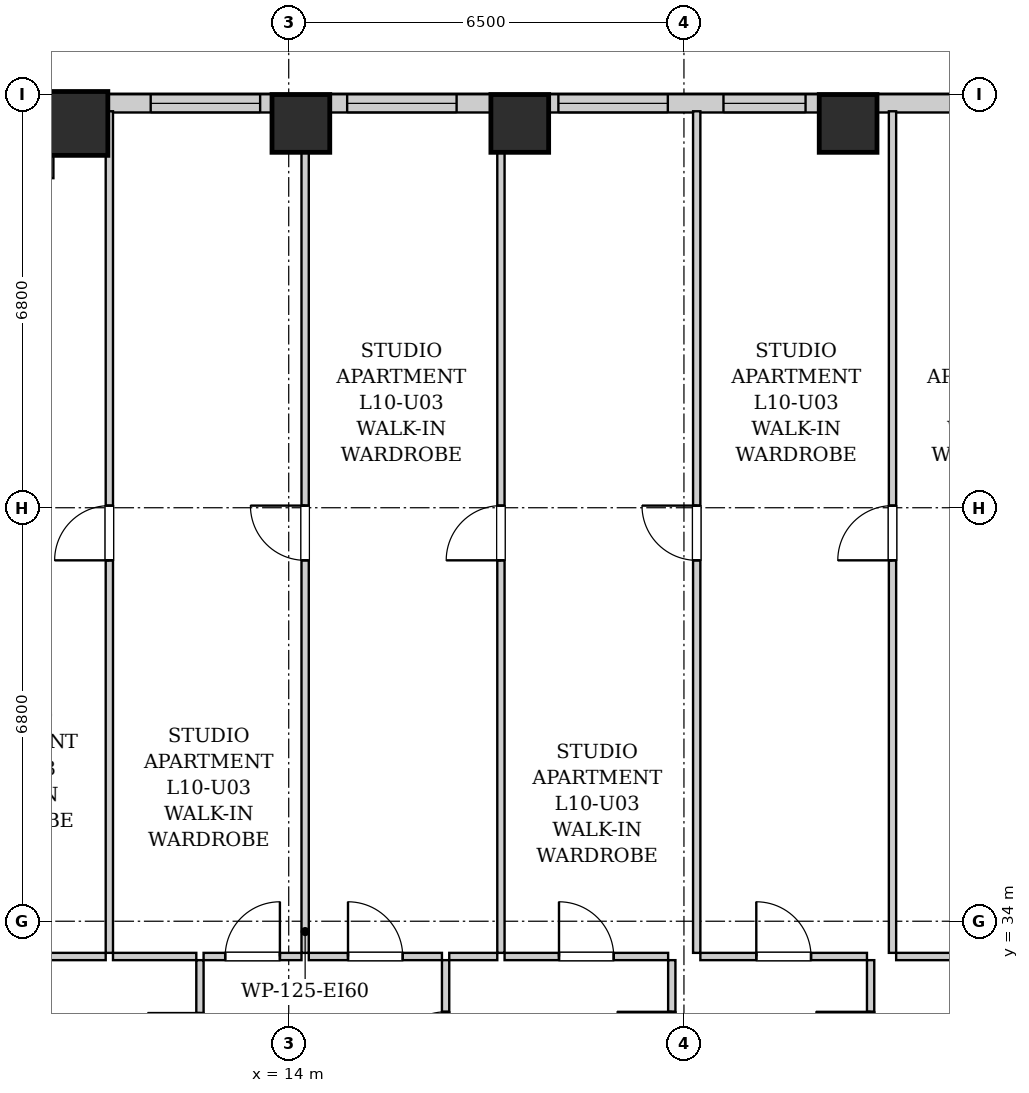
"""IFC4 building model, lengths in metres.
Left out: names, types, materials, properties, quantities, classifications, styles, units other than length and angle.
Written with IfcOpenShell. Run it as: python <this file> out.ifc"""

import sys

from ifc_helpers import new_model, si_unit, direction, frame, frame_2d, origin, origin_2d, place, context, subcontext, project, spatial, rectangle, extrude, element, fill, save


model = new_model("IFC4")
c1 = context("Model", 3, precision=1e-05, world=origin(), true_north=direction((0.0, 1.0)))
c2 = subcontext(c1, "Body", "Model", "MODEL_VIEW")
j1 = project(units=[si_unit("LENGTHUNIT", "METRE"), si_unit("PLANEANGLEUNIT", "RADIAN")], contexts=[c1])
p1 = place(None, origin())
s1 = spatial("IfcSite", under=j1, at=p1, CompositionType="ELEMENT")
p2 = place(p1, origin())
s2 = spatial("IfcBuilding", under=s1, at=p2, CompositionType="ELEMENT")
p3 = place(p2, frame((0.0, 0.0, 41.8)))
s3 = spatial("IfcBuildingStorey", under=s2, at=p3, CompositionType="ELEMENT", Elevation=41.8)
p4 = place(p3, frame((10.5, 47.12, 0.0), z_axis=(0.0, 0.0, 1.0), x_axis=(1.0, 0.0, 0.0)))
e1 = element("IfcColumn", 1, at=p4, inside=s3, PredefinedType="COLUMN", context=c2, shape_type="SweptSolid", body=[
    extrude(rectangle(XDim=1.05, YDim=1.05, at=origin_2d()), origin(), (0.0, 0.0, 1.0), 3.2),
])
for number, where, z_axis, x_axis in (
    (2, (14.2, 47.12, 0.0), (0.0, 0.0, 1.0), (1.0, 0.0, 0.0)),
    (3, (17.8, 47.12, 0.0), (0.0, 0.0, 1.0), (1.0, 0.0, 0.0)),
    (4, (23.2, 47.12, 0.0), (0.0, 0.0, 1.0), (1.0, 0.0, 0.0)),
):
    element("IfcColumn", number, at=place(p3, frame(where, z_axis=z_axis, x_axis=x_axis)), inside=s3, PredefinedType="COLUMN", context=c2, shape_type="SweptSolid", body=[
        extrude(rectangle(XDim=0.95, YDim=0.95, at=origin_2d()), origin(), (0.0, 0.0, 1.0), 3.2),
    ])
p5 = place(p3, frame((10.0, 47.45, 0.0), z_axis=(0.0, 0.0, 1.0), x_axis=(1.0, 0.0, 0.0)))
e5 = element("IfcWall", 5, at=p5, inside=s3, PredefinedType="SOLIDWALL", context=c2, shape_type="SweptSolid", body=[
    extrude(rectangle(XDim=25.7, YDim=0.3, at=frame_2d((12.85, 0.0))), origin(), (0.0, 0.0, 1.0), 1.975),
])
p6 = place(p5, frame((1.73, 0.0, 0.55)))
e6 = element("IfcOpeningElement", 6, at=p6, cuts=e5, PredefinedType="OPENING", context=c2, shape_type="SweptSolid", body=[
    extrude(rectangle(XDim=1.8, YDim=1.2, at=frame_2d((0.9, 0.6))), frame((0.0, 0.16, 0.0), z_axis=(0.0, -1.0, 0.0), x_axis=(1.0, 0.0, 0.0)), (0.0, 0.0, 1.0), 0.32),
])
p7 = place(p5, frame((4.961, 0.0, 0.55)))
e7 = element("IfcOpeningElement", 7, at=p7, cuts=e5, PredefinedType="OPENING", context=c2, shape_type="SweptSolid", body=[
    extrude(rectangle(XDim=1.8, YDim=1.2, at=frame_2d((0.9, 0.6))), frame((0.0, 0.16, 0.0), z_axis=(0.0, -1.0, 0.0), x_axis=(1.0, 0.0, 0.0)), (0.0, 0.0, 1.0), 0.32),
])
p8 = place(p5, frame((8.435, 0.0, 0.55)))
e8 = element("IfcOpeningElement", 8, at=p8, cuts=e5, PredefinedType="OPENING", context=c2, shape_type="SweptSolid", body=[
    extrude(rectangle(XDim=1.8, YDim=1.2, at=frame_2d((0.9, 0.6))), frame((0.0, 0.16, 0.0), z_axis=(0.0, -1.0, 0.0), x_axis=(1.0, 0.0, 0.0)), (0.0, 0.0, 1.0), 0.32),
])
p9 = place(p5, frame((11.15, 0.0, 0.55)))
e9 = element("IfcOpeningElement", 9, at=p9, cuts=e5, PredefinedType="OPENING", context=c2, shape_type="SweptSolid", body=[
    extrude(rectangle(XDim=1.35, YDim=1.2, at=frame_2d((0.675, 0.6))), frame((0.0, 0.16, 0.0), z_axis=(0.0, -1.0, 0.0), x_axis=(1.0, 0.0, 0.0)), (0.0, 0.0, 1.0), 0.32),
])
p10 = place(p5, frame((17.812, 0.0, 0.55)))
e10 = element("IfcOpeningElement", 10, at=p10, cuts=e5, PredefinedType="OPENING", context=c2, shape_type="SweptSolid", body=[
    extrude(rectangle(XDim=1.8, YDim=1.2, at=frame_2d((0.9, 0.6))), frame((0.0, 0.16, 0.0), z_axis=(0.0, -1.0, 0.0), x_axis=(1.0, 0.0, 0.0)), (0.0, 0.0, 1.0), 0.32),
])
p11 = place(p5, frame((20.765, 0.0, 0.55)))
e11 = element("IfcOpeningElement", 11, at=p11, cuts=e5, PredefinedType="OPENING", context=c2, shape_type="SweptSolid", body=[
    extrude(rectangle(XDim=1.8, YDim=1.2, at=frame_2d((0.9, 0.6))), frame((0.0, 0.16, 0.0), z_axis=(0.0, -1.0, 0.0), x_axis=(1.0, 0.0, 0.0)), (0.0, 0.0, 1.0), 0.32),
])
p12 = place(p5, frame((23.835, 0.0, 0.55)))
e12 = element("IfcOpeningElement", 12, at=p12, cuts=e5, PredefinedType="OPENING", context=c2, shape_type="SweptSolid", body=[
    extrude(rectangle(XDim=1.35, YDim=1.2, at=frame_2d((0.675, 0.6))), frame((0.0, 0.16, 0.0), z_axis=(0.0, -1.0, 0.0), x_axis=(1.0, 0.0, 0.0)), (0.0, 0.0, 1.0), 0.32),
])
p13 = place(p3, frame((10.0, 46.22, 0.0), z_axis=(0.0, 0.0, 1.0), x_axis=(0.0, 1.0, 0.0)))
e13 = element("IfcWall", 13, at=p13, inside=s3, PredefinedType="SOLIDWALL", context=c2, shape_type="SweptSolid", body=[
    extrude(rectangle(XDim=1.078, YDim=0.26, at=frame_2d((0.539, 0.0))), origin(), (0.0, 0.0, 1.0), 2.94),
])
p14 = place(p3, frame((12.54, 30.76, 0.0), z_axis=(0.0, 0.0, 1.0), x_axis=(0.0, 1.0, 0.0)))
e14 = element("IfcWall", 14, at=p14, inside=s3, PredefinedType="PARTITIONING", context=c2, shape_type="SweptSolid", body=[
    extrude(rectangle(XDim=2.6, YDim=0.12, at=frame_2d((1.3, 0.0))), origin(), (0.0, 0.0, 1.0), 2.94),
])
p15 = place(p14, frame((0.87, 0.0, 0.0)))
e15 = element("IfcOpeningElement", 15, at=p15, cuts=e14, PredefinedType="OPENING", context=c2, shape_type="SweptSolid", body=[
    extrude(rectangle(XDim=0.86, YDim=2.05, at=frame_2d((0.43, 1.025))), frame((0.0, 0.07, 0.0), z_axis=(0.0, -1.0, 0.0), x_axis=(1.0, 0.0, 0.0)), (0.0, 0.0, 1.0), 0.14),
])
p16 = place(p3, frame((10.08, 33.42, 0.0), z_axis=(0.0, 0.0, 1.0), x_axis=(1.0, 0.0, 0.0)))
e16 = element("IfcWall", 16, at=p16, inside=s3, PredefinedType="PARTITIONING", context=c2, shape_type="SweptSolid", body=[
    extrude(rectangle(XDim=0.91, YDim=0.12, at=frame_2d((0.455, 0.0))), origin(), (0.0, 0.0, 1.0), 2.94),
])
p17 = place(p3, frame((11.11, 33.42, 0.0), z_axis=(0.0, 0.0, 1.0), x_axis=(1.0, 0.0, 0.0)))
e17 = element("IfcWall", 17, at=p17, inside=s3, PredefinedType="PARTITIONING", context=c2, shape_type="SweptSolid", body=[
    extrude(rectangle(XDim=1.37, YDim=0.12, at=frame_2d((0.685, 0.0))), origin(), (0.0, 0.0, 1.0), 2.94),
])
p18 = place(p3, frame((16.58, 30.76, 0.0), z_axis=(0.0, 0.0, 1.0), x_axis=(0.0, 1.0, 0.0)))
e18 = element("IfcWall", 18, at=p18, inside=s3, PredefinedType="PARTITIONING", context=c2, shape_type="SweptSolid", body=[
    extrude(rectangle(XDim=2.6, YDim=0.12, at=frame_2d((1.3, 0.0))), origin(), (0.0, 0.0, 1.0), 2.94),
])
p19 = place(p18, frame((0.85, 0.0, 0.0)))
e19 = element("IfcOpeningElement", 19, at=p19, cuts=e18, PredefinedType="OPENING", context=c2, shape_type="SweptSolid", body=[
    extrude(rectangle(XDim=0.9, YDim=2.05, at=frame_2d((0.45, 1.025))), frame((0.0, 0.07, 0.0), z_axis=(0.0, -1.0, 0.0), x_axis=(1.0, 0.0, 0.0)), (0.0, 0.0, 1.0), 0.14),
])
p20 = place(p3, frame((12.6, 33.42, 0.0), z_axis=(0.0, 0.0, 1.0), x_axis=(1.0, 0.0, 0.0)))
e20 = element("IfcWall", 20, at=p20, inside=s3, PredefinedType="PARTITIONING", context=c2, shape_type="SweptSolid", body=[
    extrude(rectangle(XDim=1.61, YDim=0.12, at=frame_2d((0.805, 0.0))), origin(), (0.0, 0.0, 1.0), 2.94),
])
p21 = place(p20, frame((0.355, 0.0, 0.0)))
e21 = element("IfcOpeningElement", 21, at=p21, cuts=e20, PredefinedType="OPENING", context=c2, shape_type="SweptSolid", body=[
    extrude(rectangle(XDim=0.9, YDim=2.05, at=frame_2d((0.45, 1.025))), frame((0.0, 0.07, 0.0), z_axis=(0.0, -1.0, 0.0), x_axis=(1.0, 0.0, 0.0)), (0.0, 0.0, 1.0), 0.14),
])
p22 = place(p3, frame((14.33, 33.42, 0.0), z_axis=(0.0, 0.0, 1.0), x_axis=(1.0, 0.0, 0.0)))
e22 = element("IfcWall", 22, at=p22, inside=s3, PredefinedType="PARTITIONING", context=c2, shape_type="SweptSolid", body=[
    extrude(rectangle(XDim=2.19, YDim=0.12, at=frame_2d((1.095, 0.0))), origin(), (0.0, 0.0, 1.0), 2.94),
])
p23 = place(p22, frame((0.645, 0.0, 0.0)))
e23 = element("IfcOpeningElement", 23, at=p23, cuts=e22, PredefinedType="OPENING", context=c2, shape_type="SweptSolid", body=[
    extrude(rectangle(XDim=0.9, YDim=2.05, at=frame_2d((0.45, 1.025))), frame((0.0, 0.07, 0.0), z_axis=(0.0, -1.0, 0.0), x_axis=(1.0, 0.0, 0.0)), (0.0, 0.0, 1.0), 0.14),
])
p24 = place(p3, frame((20.3, 30.76, 0.0), z_axis=(0.0, 0.0, 1.0), x_axis=(0.0, 1.0, 0.0)))
e24 = element("IfcWall", 24, at=p24, inside=s3, PredefinedType="PARTITIONING", context=c2, shape_type="SweptSolid", body=[
    extrude(rectangle(XDim=2.6, YDim=0.12, at=frame_2d((1.3, 0.0))), origin(), (0.0, 0.0, 1.0), 2.94),
])
p25 = place(p24, frame((0.85, 0.0, 0.0)))
e25 = element("IfcOpeningElement", 25, at=p25, cuts=e24, PredefinedType="OPENING", context=c2, shape_type="SweptSolid", body=[
    extrude(rectangle(XDim=0.9, YDim=2.05, at=frame_2d((0.45, 1.025))), frame((0.0, 0.07, 0.0), z_axis=(0.0, -1.0, 0.0), x_axis=(1.0, 0.0, 0.0)), (0.0, 0.0, 1.0), 0.14),
])
p26 = place(p3, frame((16.64, 33.42, 0.0), z_axis=(0.0, 0.0, 1.0), x_axis=(1.0, 0.0, 0.0)))
e26 = element("IfcWall", 26, at=p26, inside=s3, PredefinedType="PARTITIONING", context=c2, shape_type="SweptSolid", body=[
    extrude(rectangle(XDim=0.79, YDim=0.12, at=frame_2d((0.395, 0.0))), origin(), (0.0, 0.0, 1.0), 2.94),
])
p27 = place(p3, frame((17.55, 33.42, 0.0), z_axis=(0.0, 0.0, 1.0), x_axis=(1.0, 0.0, 0.0)))
e27 = element("IfcWall", 27, at=p27, inside=s3, PredefinedType="PARTITIONING", context=c2, shape_type="SweptSolid", body=[
    extrude(rectangle(XDim=2.69, YDim=0.12, at=frame_2d((1.345, 0.0))), origin(), (0.0, 0.0, 1.0), 2.94),
])
p28 = place(p27, frame((0.895, 0.0, 0.0)))
e28 = element("IfcOpeningElement", 28, at=p28, cuts=e27, PredefinedType="OPENING", context=c2, shape_type="SweptSolid", body=[
    extrude(rectangle(XDim=0.9, YDim=2.05, at=frame_2d((0.45, 1.025))), frame((0.0, 0.07, 0.0), z_axis=(0.0, -1.0, 0.0), x_axis=(1.0, 0.0, 0.0)), (0.0, 0.0, 1.0), 0.14),
])
p29 = place(p3, frame((23.57, 30.76, 0.0), z_axis=(0.0, 0.0, 1.0), x_axis=(0.0, 1.0, 0.0)))
e29 = element("IfcWall", 29, at=p29, inside=s3, PredefinedType="PARTITIONING", context=c2, shape_type="SweptSolid", body=[
    extrude(rectangle(XDim=2.6, YDim=0.12, at=frame_2d((1.3, 0.0))), origin(), (0.0, 0.0, 1.0), 2.94),
])
p30 = place(p29, frame((0.85, 0.0, 0.0)))
e30 = element("IfcOpeningElement", 30, at=p30, cuts=e29, PredefinedType="OPENING", context=c2, shape_type="SweptSolid", body=[
    extrude(rectangle(XDim=0.9, YDim=2.05, at=frame_2d((0.45, 1.025))), frame((0.0, 0.07, 0.0), z_axis=(0.0, -1.0, 0.0), x_axis=(1.0, 0.0, 0.0)), (0.0, 0.0, 1.0), 0.14),
])
p31 = place(p3, frame((20.77, 33.42, 0.0), z_axis=(0.0, 0.0, 1.0), x_axis=(1.0, 0.0, 0.0)))
e31 = element("IfcWall", 31, at=p31, inside=s3, PredefinedType="PARTITIONING", context=c2, shape_type="SweptSolid", body=[
    extrude(rectangle(XDim=2.74, YDim=0.12, at=frame_2d((1.37, 0.0))), origin(), (0.0, 0.0, 1.0), 2.94),
])
p32 = place(p31, frame((0.92, 0.0, 0.0)))
e32 = element("IfcOpeningElement", 32, at=p32, cuts=e31, PredefinedType="OPENING", context=c2, shape_type="SweptSolid", body=[
    extrude(rectangle(XDim=0.9, YDim=2.05, at=frame_2d((0.45, 1.025))), frame((0.0, 0.07, 0.0), z_axis=(0.0, -1.0, 0.0), x_axis=(1.0, 0.0, 0.0)), (0.0, 0.0, 1.0), 0.14),
])
p33 = place(p3, frame((23.99, 33.42, 0.0), z_axis=(0.0, 0.0, 1.0), x_axis=(1.0, 0.0, 0.0)))
e33 = element("IfcWall", 33, at=p33, inside=s3, PredefinedType="PARTITIONING", context=c2, shape_type="SweptSolid", body=[
    extrude(rectangle(XDim=3.1, YDim=0.12, at=frame_2d((1.55, 0.0))), origin(), (0.0, 0.0, 1.0), 2.94),
])
p34 = place(p33, frame((1.1, 0.0, 0.0)))
e34 = element("IfcOpeningElement", 34, at=p34, cuts=e33, PredefinedType="OPENING", context=c2, shape_type="SweptSolid", body=[
    extrude(rectangle(XDim=0.9, YDim=2.05, at=frame_2d((0.45, 1.025))), frame((0.0, 0.07, 0.0), z_axis=(0.0, -1.0, 0.0), x_axis=(1.0, 0.0, 0.0)), (0.0, 0.0, 1.0), 0.14),
])
p35 = place(p3, frame((11.05, 33.48, 0.0), z_axis=(0.0, 0.0, 1.0), x_axis=(0.0, 1.0, 0.0)))
e35 = element("IfcWall", 35, at=p35, inside=s3, PredefinedType="PARTITIONING", context=c2, shape_type="SweptSolid", body=[
    extrude(rectangle(XDim=13.84, YDim=0.12, at=frame_2d((6.92, 0.0))), origin(), (0.0, 0.0, 1.0), 2.94),
])
p36 = place(p35, frame((6.455, 0.0, 0.0)))
e36 = element("IfcOpeningElement", 36, at=p36, cuts=e35, PredefinedType="OPENING", context=c2, shape_type="SweptSolid", body=[
    extrude(rectangle(XDim=0.9, YDim=2.05, at=frame_2d((0.45, 1.025))), frame((0.0, 0.07, 0.0), z_axis=(0.0, -1.0, 0.0), x_axis=(1.0, 0.0, 0.0)), (0.0, 0.0, 1.0), 0.14),
])
p37 = place(p3, frame((14.27, 33.48, 0.0), z_axis=(0.0, 0.0, 1.0), x_axis=(0.0, 1.0, 0.0)))
e37 = element("IfcWall", 37, at=p37, inside=s3, PredefinedType="PARTITIONING", context=c2, shape_type="SweptSolid", body=[
    extrude(rectangle(XDim=13.84, YDim=0.12, at=frame_2d((6.92, 0.0))), origin(), (0.0, 0.0, 1.0), 2.94),
])
p38 = place(p37, frame((6.455, 0.0, 0.0)))
e38 = element("IfcOpeningElement", 38, at=p38, cuts=e37, PredefinedType="OPENING", context=c2, shape_type="SweptSolid", body=[
    extrude(rectangle(XDim=0.9, YDim=2.05, at=frame_2d((0.45, 1.025))), frame((0.0, 0.07, 0.0), z_axis=(0.0, -1.0, 0.0), x_axis=(1.0, 0.0, 0.0)), (0.0, 0.0, 1.0), 0.14),
])
p39 = place(p3, frame((17.49, 33.48, 0.0), z_axis=(0.0, 0.0, 1.0), x_axis=(0.0, 1.0, 0.0)))
e39 = element("IfcWall", 39, at=p39, inside=s3, PredefinedType="PARTITIONING", context=c2, shape_type="SweptSolid", body=[
    extrude(rectangle(XDim=13.84, YDim=0.12, at=frame_2d((6.92, 0.0))), origin(), (0.0, 0.0, 1.0), 2.94),
])
p40 = place(p39, frame((6.455, 0.0, 0.0)))
e40 = element("IfcOpeningElement", 40, at=p40, cuts=e39, PredefinedType="OPENING", context=c2, shape_type="SweptSolid", body=[
    extrude(rectangle(XDim=0.9, YDim=2.05, at=frame_2d((0.45, 1.025))), frame((0.0, 0.07, 0.0), z_axis=(0.0, -1.0, 0.0), x_axis=(1.0, 0.0, 0.0)), (0.0, 0.0, 1.0), 0.14),
])
p41 = place(p3, frame((20.71, 33.48, 0.0), z_axis=(0.0, 0.0, 1.0), x_axis=(0.0, 1.0, 0.0)))
e41 = element("IfcWall", 41, at=p41, inside=s3, PredefinedType="PARTITIONING", context=c2, shape_type="SweptSolid", body=[
    extrude(rectangle(XDim=13.84, YDim=0.12, at=frame_2d((6.92, 0.0))), origin(), (0.0, 0.0, 1.0), 2.94),
])
p42 = place(p41, frame((6.455, 0.0, 0.0)))
e42 = element("IfcOpeningElement", 42, at=p42, cuts=e41, PredefinedType="OPENING", context=c2, shape_type="SweptSolid", body=[
    extrude(rectangle(XDim=0.9, YDim=2.05, at=frame_2d((0.45, 1.025))), frame((0.0, 0.07, 0.0), z_axis=(0.0, -1.0, 0.0), x_axis=(1.0, 0.0, 0.0)), (0.0, 0.0, 1.0), 0.14),
])
p43 = place(p3, frame((23.93, 33.48, 0.0), z_axis=(0.0, 0.0, 1.0), x_axis=(0.0, 1.0, 0.0)))
e43 = element("IfcWall", 43, at=p43, inside=s3, PredefinedType="PARTITIONING", context=c2, shape_type="SweptSolid", body=[
    extrude(rectangle(XDim=13.84, YDim=0.12, at=frame_2d((6.92, 0.0))), origin(), (0.0, 0.0, 1.0), 2.94),
])
p44 = place(p43, frame((6.455, 0.0, 0.0)))
e44 = element("IfcOpeningElement", 44, at=p44, cuts=e43, PredefinedType="OPENING", context=c2, shape_type="SweptSolid", body=[
    extrude(rectangle(XDim=0.9, YDim=2.05, at=frame_2d((0.45, 1.025))), frame((0.0, 0.07, 0.0), z_axis=(0.0, -1.0, 0.0), x_axis=(1.0, 0.0, 0.0)), (0.0, 0.0, 1.0), 0.14),
])
p45 = place(p15, origin())
e45 = element("IfcDoor", 45, at=p45, inside=s3, OperationType="SINGLE_SWING_RIGHT", PredefinedType="DOOR", context=c2, shape_type="SweptSolid", body=[
    extrude(rectangle(XDim=0.86, YDim=2.05, at=frame_2d((0.43, 1.025))), frame((0.0, 0.025, 0.0), z_axis=(0.0, -1.0, 0.0), x_axis=(1.0, 0.0, 0.0)), (0.0, 0.0, 1.0), 0.05),
])
fill(e15, e45)
p46 = place(p19, origin())
e46 = element("IfcDoor", 46, at=p46, inside=s3, OperationType="SINGLE_SWING_LEFT", PredefinedType="DOOR", context=c2, shape_type="SweptSolid", body=[
    extrude(rectangle(XDim=0.9, YDim=2.05, at=frame_2d((0.45, 1.025))), frame((0.0, 0.025, 0.0), z_axis=(0.0, -1.0, 0.0), x_axis=(1.0, 0.0, 0.0)), (0.0, 0.0, 1.0), 0.05),
])
fill(e19, e46)
p47 = place(p21, origin())
e47 = element("IfcDoor", 47, at=p47, inside=s3, OperationType="SINGLE_SWING_RIGHT", PredefinedType="DOOR", context=c2, shape_type="SweptSolid", body=[
    extrude(rectangle(XDim=0.9, YDim=2.05, at=frame_2d((0.45, 1.025))), frame((0.0, 0.025, 0.0), z_axis=(0.0, -1.0, 0.0), x_axis=(1.0, 0.0, 0.0)), (0.0, 0.0, 1.0), 0.05),
])
fill(e21, e47)
p48 = place(p23, origin())
e48 = element("IfcDoor", 48, at=p48, inside=s3, OperationType="SINGLE_SWING_LEFT", PredefinedType="DOOR", context=c2, shape_type="SweptSolid", body=[
    extrude(rectangle(XDim=0.9, YDim=2.05, at=frame_2d((0.45, 1.025))), frame((0.0, 0.025, 0.0), z_axis=(0.0, -1.0, 0.0), x_axis=(1.0, 0.0, 0.0)), (0.0, 0.0, 1.0), 0.05),
])
fill(e23, e48)
p49 = place(p25, origin())
e49 = element("IfcDoor", 49, at=p49, inside=s3, OperationType="SINGLE_SWING_RIGHT", PredefinedType="DOOR", context=c2, shape_type="SweptSolid", body=[
    extrude(rectangle(XDim=0.9, YDim=2.05, at=frame_2d((0.45, 1.025))), frame((0.0, 0.025, 0.0), z_axis=(0.0, -1.0, 0.0), x_axis=(1.0, 0.0, 0.0)), (0.0, 0.0, 1.0), 0.05),
])
fill(e25, e49)
p50 = place(p28, origin())
e50 = element("IfcDoor", 50, at=p50, inside=s3, OperationType="SINGLE_SWING_LEFT", PredefinedType="DOOR", context=c2, shape_type="SweptSolid", body=[
    extrude(rectangle(XDim=0.9, YDim=2.05, at=frame_2d((0.45, 1.025))), frame((0.0, 0.025, 0.0), z_axis=(0.0, -1.0, 0.0), x_axis=(1.0, 0.0, 0.0)), (0.0, 0.0, 1.0), 0.05),
])
fill(e28, e50)
p51 = place(p30, origin())
e51 = element("IfcDoor", 51, at=p51, inside=s3, OperationType="SINGLE_SWING_RIGHT", PredefinedType="DOOR", context=c2, shape_type="SweptSolid", body=[
    extrude(rectangle(XDim=0.9, YDim=2.05, at=frame_2d((0.45, 1.025))), frame((0.0, 0.025, 0.0), z_axis=(0.0, -1.0, 0.0), x_axis=(1.0, 0.0, 0.0)), (0.0, 0.0, 1.0), 0.05),
])
fill(e30, e51)
p52 = place(p32, origin())
e52 = element("IfcDoor", 52, at=p52, inside=s3, OperationType="SINGLE_SWING_LEFT", PredefinedType="DOOR", context=c2, shape_type="SweptSolid", body=[
    extrude(rectangle(XDim=0.9, YDim=2.05, at=frame_2d((0.45, 1.025))), frame((0.0, 0.025, 0.0), z_axis=(0.0, -1.0, 0.0), x_axis=(1.0, 0.0, 0.0)), (0.0, 0.0, 1.0), 0.05),
])
fill(e32, e52)
p53 = place(p36, origin())
e53 = element("IfcDoor", 53, at=p53, inside=s3, OperationType="SINGLE_SWING_LEFT", PredefinedType="DOOR", context=c2, shape_type="SweptSolid", body=[
    extrude(rectangle(XDim=0.9, YDim=2.05, at=frame_2d((0.45, 1.025))), frame((0.0, 0.025, 0.0), z_axis=(0.0, -1.0, 0.0), x_axis=(1.0, 0.0, 0.0)), (0.0, 0.0, 1.0), 0.05),
])
fill(e36, e53)
p54 = place(p38, origin())
e54 = element("IfcDoor", 54, at=p54, inside=s3, OperationType="SINGLE_SWING_RIGHT", PredefinedType="DOOR", context=c2, shape_type="SweptSolid", body=[
    extrude(rectangle(XDim=0.9, YDim=2.05, at=frame_2d((0.45, 1.025))), frame((0.0, 0.025, 0.0), z_axis=(0.0, -1.0, 0.0), x_axis=(1.0, 0.0, 0.0)), (0.0, 0.0, 1.0), 0.05),
])
fill(e38, e54)
p55 = place(p40, origin())
e55 = element("IfcDoor", 55, at=p55, inside=s3, OperationType="SINGLE_SWING_LEFT", PredefinedType="DOOR", context=c2, shape_type="SweptSolid", body=[
    extrude(rectangle(XDim=0.9, YDim=2.05, at=frame_2d((0.45, 1.025))), frame((0.0, 0.025, 0.0), z_axis=(0.0, -1.0, 0.0), x_axis=(1.0, 0.0, 0.0)), (0.0, 0.0, 1.0), 0.05),
])
fill(e40, e55)
p56 = place(p42, origin())
e56 = element("IfcDoor", 56, at=p56, inside=s3, OperationType="SINGLE_SWING_RIGHT", PredefinedType="DOOR", context=c2, shape_type="SweptSolid", body=[
    extrude(rectangle(XDim=0.9, YDim=2.05, at=frame_2d((0.45, 1.025))), frame((0.0, 0.025, 0.0), z_axis=(0.0, -1.0, 0.0), x_axis=(1.0, 0.0, 0.0)), (0.0, 0.0, 1.0), 0.05),
])
fill(e42, e56)
p57 = place(p44, origin())
e57 = element("IfcDoor", 57, at=p57, inside=s3, OperationType="SINGLE_SWING_LEFT", PredefinedType="DOOR", context=c2, shape_type="SweptSolid", body=[
    extrude(rectangle(XDim=0.9, YDim=2.05, at=frame_2d((0.45, 1.025))), frame((0.0, 0.025, 0.0), z_axis=(0.0, -1.0, 0.0), x_axis=(1.0, 0.0, 0.0)), (0.0, 0.0, 1.0), 0.05),
])
fill(e44, e57)
p58 = place(p6, origin())
e58 = element("IfcWindow", 58, at=p58, inside=s3, PartitioningType="DOUBLE_PANEL_VERTICAL", PredefinedType="WINDOW", context=c2, shape_type="SweptSolid", body=[
    extrude(rectangle(XDim=1.8, YDim=1.2, at=frame_2d((0.9, 0.6))), frame((0.0, 0.03, 0.0), z_axis=(0.0, -1.0, 0.0), x_axis=(1.0, 0.0, 0.0)), (0.0, 0.0, 1.0), 0.06),
])
fill(e6, e58)
p59 = place(p7, origin())
e59 = element("IfcWindow", 59, at=p59, inside=s3, PartitioningType="DOUBLE_PANEL_VERTICAL", PredefinedType="WINDOW", context=c2, shape_type="SweptSolid", body=[
    extrude(rectangle(XDim=1.8, YDim=1.2, at=frame_2d((0.9, 0.6))), frame((0.0, 0.03, 0.0), z_axis=(0.0, -1.0, 0.0), x_axis=(1.0, 0.0, 0.0)), (0.0, 0.0, 1.0), 0.06),
])
fill(e7, e59)
p60 = place(p8, origin())
e60 = element("IfcWindow", 60, at=p60, inside=s3, PartitioningType="DOUBLE_PANEL_VERTICAL", PredefinedType="WINDOW", context=c2, shape_type="SweptSolid", body=[
    extrude(rectangle(XDim=1.8, YDim=1.2, at=frame_2d((0.9, 0.6))), frame((0.0, 0.03, 0.0), z_axis=(0.0, -1.0, 0.0), x_axis=(1.0, 0.0, 0.0)), (0.0, 0.0, 1.0), 0.06),
])
fill(e8, e60)
p61 = place(p9, origin())
e61 = element("IfcWindow", 61, at=p61, inside=s3, PartitioningType="SINGLE_PANEL", PredefinedType="WINDOW", context=c2, shape_type="SweptSolid", body=[
    extrude(rectangle(XDim=1.35, YDim=1.2, at=frame_2d((0.675, 0.6))), frame((0.0, 0.03, 0.0), z_axis=(0.0, -1.0, 0.0), x_axis=(1.0, 0.0, 0.0)), (0.0, 0.0, 1.0), 0.06),
])
fill(e9, e61)
save(model, sys.argv[1])
